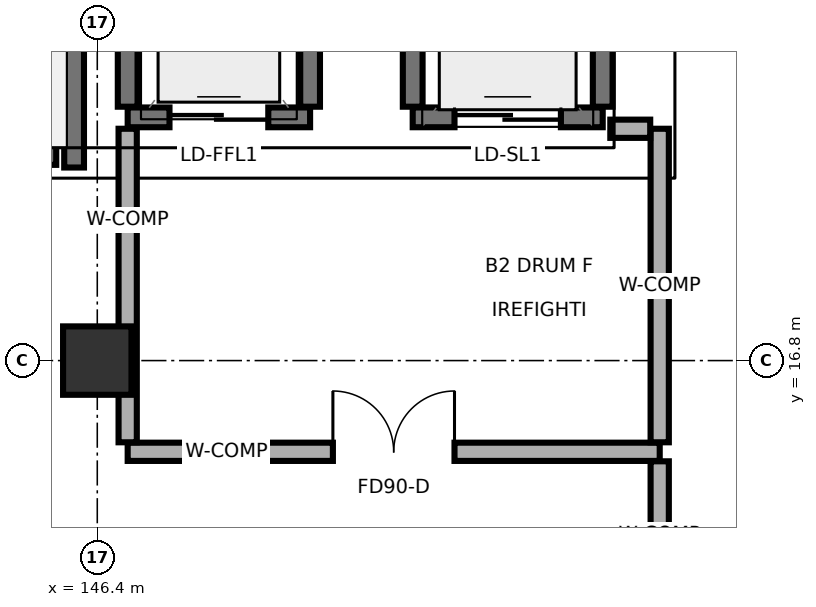
"""IFC4 building model, lengths in metres.
Left out: names, types, materials, properties, quantities, classifications, styles, units other than length and angle.
Written with IfcOpenShell. Run it as: python <this file> out.ifc"""

import sys

from ifc_helpers import new_model, si_unit, direction, frame, frame_2d, origin, origin_2d, place, context, subcontext, project, spatial, rectangle, extrude, element, fill, save


model = new_model("IFC4")
c1 = context("Model", 3, precision=1e-05, world=origin(), true_north=direction((0.0, 1.0)))
c2 = subcontext(c1, "Body", "Model", "MODEL_VIEW")
j1 = project(units=[si_unit("LENGTHUNIT", "METRE"), si_unit("PLANEANGLEUNIT", "RADIAN")], contexts=[c1])
p1 = place(None, origin())
s1 = spatial("IfcSite", under=j1, at=p1, CompositionType="ELEMENT")
p2 = place(p1, origin())
s2 = spatial("IfcBuilding", under=s1, at=p2, CompositionType="ELEMENT")
p3 = place(p2, frame((0.0, 0.0, -8.4)))
s3 = spatial("IfcBuildingStorey", under=s2, at=p3, CompositionType="ELEMENT", Elevation=-8.4)
p4 = place(p3, frame((146.4, 16.8, 0.0), z_axis=(0.0, 0.0, 1.0), x_axis=(1.0, 0.0, 0.0)))
e1 = element("IfcColumn", 1, at=p4, inside=s3, PredefinedType="COLUMN", context=c2, shape_type="SweptSolid", body=[
    extrude(rectangle(XDim=0.9, YDim=0.9, at=origin_2d()), origin(), (0.0, 0.0, 1.0), 4.2),
])
p5 = place(p3, frame((146.095, 19.34, 0.0), z_axis=(0.0, 0.0, 1.0), x_axis=(0.0, 1.0, 0.0)))
e2 = element("IfcWall", 2, at=p5, inside=s3, PredefinedType="SHEAR", context=c2, shape_type="SweptSolid", body=[
    extrude(rectangle(XDim=4.27, YDim=0.26, at=frame_2d((2.135, 0.0))), origin(), (0.0, 0.0, 1.0), 3.93),
])
p6 = place(p3, frame((137.34, 19.505, 0.0), z_axis=(0.0, 0.0, 1.0), x_axis=(1.0, 0.0, 0.0)))
e3 = element("IfcWall", 3, at=p6, inside=s3, PredefinedType="SHEAR", context=c2, shape_type="SweptSolid", body=[
    extrude(rectangle(XDim=8.52, YDim=0.26, at=frame_2d((4.26, 0.0))), origin(), (0.0, 0.0, 1.0), 3.93),
])
p7 = place(p3, frame((146.8, 20.0, -0.95), z_axis=(0.0, 0.0, 1.0), x_axis=(1.0, 0.0, 0.0)))
e4 = element("IfcWall", 4, at=p7, inside=s3, PredefinedType="SHEAR", context=c2, shape_type="SweptSolid", body=[
    extrude(rectangle(XDim=2.4, YDim=0.26, at=frame_2d((1.2, 0.0))), origin(), (0.0, 0.0, 1.0), 4.88),
])
p8 = place(p7, frame((0.55, 0.0, 0.95)))
e5 = element("IfcOpeningElement", 5, at=p8, cuts=e4, PredefinedType="OPENING", context=c2, shape_type="SweptSolid", body=[
    extrude(rectangle(XDim=1.3, YDim=2.25, at=frame_2d((0.65, 1.125))), frame((0.0, 0.14, 0.0), z_axis=(0.0, -1.0, 0.0), x_axis=(1.0, 0.0, 0.0)), (0.0, 0.0, 1.0), 0.28),
])
for number, where, z_axis, x_axis in (
    (6, (146.8, 20.14, -0.95), (0.0, 0.0, 1.0), (0.0, 1.0, 0.0)),
    (7, (149.2, 20.14, -0.95), (0.0, 0.0, 1.0), (0.0, 1.0, 0.0)),
):
    element("IfcWall", number, at=place(p3, frame(where, z_axis=z_axis, x_axis=x_axis)), inside=s3, PredefinedType="SHEAR", context=c2, shape_type="SweptSolid", body=[
        extrude(rectangle(XDim=2.52, YDim=0.26, at=frame_2d((1.26, 0.0))), origin(), (0.0, 0.0, 1.0), 4.88),
    ])
p9 = place(p3, frame((150.55, 20.0, -0.95), z_axis=(0.0, 0.0, 1.0), x_axis=(1.0, 0.0, 0.0)))
e8 = element("IfcWall", 8, at=p9, inside=s3, PredefinedType="SHEAR", context=c2, shape_type="SweptSolid", body=[
    extrude(rectangle(XDim=2.5, YDim=0.26, at=frame_2d((1.25, 0.0))), origin(), (0.0, 0.0, 1.0), 4.88),
])
p10 = place(p9, frame((0.55, 0.0, 0.95)))
e9 = element("IfcOpeningElement", 9, at=p10, cuts=e8, PredefinedType="OPENING", context=c2, shape_type="SweptSolid", body=[
    extrude(rectangle(XDim=1.4, YDim=2.3, at=frame_2d((0.7, 1.15))), frame((0.0, 0.14, 0.0), z_axis=(0.0, -1.0, 0.0), x_axis=(1.0, 0.0, 0.0)), (0.0, 0.0, 1.0), 0.28),
])
for number, where, z_axis, x_axis in (
    (10, (150.55, 20.14, -0.95), (0.0, 0.0, 1.0), (0.0, 1.0, 0.0)),
    (11, (153.05, 20.14, -0.95), (0.0, 0.0, 1.0), (0.0, 1.0, 0.0)),
):
    element("IfcWall", number, at=place(p3, frame(where, z_axis=z_axis, x_axis=x_axis)), inside=s3, PredefinedType="SHEAR", context=c2, shape_type="SweptSolid", body=[
        extrude(rectangle(XDim=2.52, YDim=0.26, at=frame_2d((1.26, 0.0))), origin(), (0.0, 0.0, 1.0), 4.88),
    ])
p11 = place(p3, frame((146.8, 15.6, 0.0), z_axis=(0.0, 0.0, 1.0), x_axis=(1.0, 0.0, 0.0)))
e12 = element("IfcWall", 12, at=p11, inside=s3, PredefinedType="SOLIDWALL", context=c2, shape_type="SweptSolid", body=[
    extrude(rectangle(XDim=7.0, YDim=0.24, at=frame_2d((3.5, 0.0))), origin(), (0.0, 0.0, 1.0), 3.93),
])
p12 = place(p11, frame((2.7, 0.0, 0.0)))
e13 = element("IfcOpeningElement", 13, at=p12, cuts=e12, PredefinedType="OPENING", context=c2, shape_type="SweptSolid", body=[
    extrude(rectangle(XDim=1.6, YDim=2.2, at=frame_2d((0.8, 1.1))), frame((0.0, 0.13, 0.0), z_axis=(0.0, -1.0, 0.0), x_axis=(1.0, 0.0, 0.0)), (0.0, 0.0, 1.0), 0.26),
])
for number, where, z_axis, x_axis in (
    (14, (146.8, 15.725, 0.0), (0.0, 0.0, 1.0), (0.0, 1.0, 0.0)),
    (15, (153.8, 15.725, 0.0), (0.0, 0.0, 1.0), (0.0, 1.0, 0.0)),
):
    element("IfcWall", number, at=place(p3, frame(where, z_axis=z_axis, x_axis=x_axis)), inside=s3, PredefinedType="SOLIDWALL", context=c2, shape_type="SweptSolid", body=[
        extrude(rectangle(XDim=4.125, YDim=0.24, at=frame_2d((2.062, 0.0))), origin(), (0.0, 0.0, 1.0), 3.475),
    ])
p13 = place(p3, frame((153.15, 19.85, 0.0), z_axis=(0.0, 0.0, 1.0), x_axis=(1.0, 0.0, 0.0)))
e16 = element("IfcWall", 16, at=p13, inside=s3, PredefinedType="SOLIDWALL", context=c2, shape_type="SweptSolid", body=[
    extrude(rectangle(XDim=0.525, YDim=0.24, at=frame_2d((0.263, 0.0))), origin(), (0.0, 0.0, 1.0), 3.93),
])
p14 = place(p3, frame((153.8, 13.525, 0.0), z_axis=(0.0, 0.0, 1.0), x_axis=(0.0, 1.0, 0.0)))
e17 = element("IfcWall", 17, at=p14, inside=s3, PredefinedType="SOLIDWALL", context=c2, shape_type="SweptSolid", body=[
    extrude(rectangle(XDim=1.95, YDim=0.24, at=frame_2d((0.975, 0.0))), origin(), (0.0, 0.0, 1.0), 3.93),
])
p15 = place(p8, origin())
e18 = element("IfcDoor", 18, at=p15, inside=s3, OperationType="SLIDING_TO_RIGHT", PredefinedType="DOOR", context=c2, shape_type="SweptSolid", body=[
    extrude(rectangle(XDim=1.3, YDim=2.25, at=frame_2d((0.65, 1.125))), frame((0.0, 0.025, 0.0), z_axis=(0.0, -1.0, 0.0), x_axis=(1.0, 0.0, 0.0)), (0.0, 0.0, 1.0), 0.05),
])
fill(e5, e18)
p16 = place(p10, origin())
e19 = element("IfcDoor", 19, at=p16, inside=s3, OperationType="SLIDING_TO_LEFT", PredefinedType="DOOR", context=c2, shape_type="SweptSolid", body=[
    extrude(rectangle(XDim=1.4, YDim=2.3, at=frame_2d((0.7, 1.15))), frame((0.0, 0.025, 0.0), z_axis=(0.0, -1.0, 0.0), x_axis=(1.0, 0.0, 0.0)), (0.0, 0.0, 1.0), 0.05),
])
fill(e9, e19)
p17 = place(p12, origin())
e20 = element("IfcDoor", 20, at=p17, inside=s3, OperationType="DOUBLE_DOOR_SINGLE_SWING", PredefinedType="DOOR", context=c2, shape_type="SweptSolid", body=[
    extrude(rectangle(XDim=1.6, YDim=2.2, at=frame_2d((0.8, 1.1))), frame((0.0, 0.025, 0.0), z_axis=(0.0, -1.0, 0.0), x_axis=(1.0, 0.0, 0.0)), (0.0, 0.0, 1.0), 0.05),
])
fill(e13, e20)
save(model, sys.argv[1])
